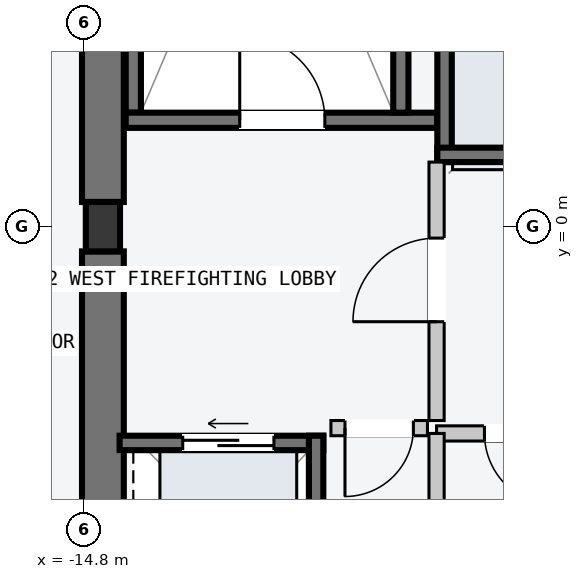
"""IFC4 building model, lengths in metres.
Left out: names, types, materials, properties, quantities, classifications, styles, units other than length and angle.
Written with IfcOpenShell. Run it as: python <this file> out.ifc"""

import sys

from ifc_helpers import new_model, si_unit, direction, frame, frame_2d, origin, origin_2d, place, context, subcontext, project, spatial, rectangle, i_section, extrude, element, fill, save


model = new_model("IFC4")
c1 = context("Model", 3, precision=1e-05, world=origin(), true_north=direction((0.0, 1.0)))
c2 = subcontext(c1, "Body", "Model", "MODEL_VIEW")
j1 = project(units=[si_unit("LENGTHUNIT", "METRE"), si_unit("PLANEANGLEUNIT", "RADIAN")], contexts=[c1])
p1 = place(None, origin())
s1 = spatial("IfcSite", under=j1, at=p1, CompositionType="ELEMENT")
p2 = place(p1, origin())
s2 = spatial("IfcBuilding", under=s1, at=p2, CompositionType="ELEMENT")
p3 = place(p2, frame((0.0, 0.0, 49.2)))
s3 = spatial("IfcBuildingStorey", under=s2, at=p3, CompositionType="ELEMENT", Elevation=49.2)
for number, where, z_axis, x_axis in (
    (1, (-14.55, -9.425, -0.2), (0.0, 0.0, 1.0), (0.0, 1.0, 0.0)),
    (2, (-14.55, 0.325, -0.2), (0.0, 0.0, 1.0), (0.0, 1.0, 0.0)),
):
    element("IfcWall", number, at=place(p3, frame(where, z_axis=z_axis, x_axis=x_axis)), inside=s3, PredefinedType="SHEAR", context=c2, shape_type="SweptSolid", body=[
        extrude(rectangle(XDim=9.1, YDim=0.55, at=frame_2d((4.55, 0.0))), origin(), (0.0, 0.0, 1.0), 3.6),
    ])
p4 = place(p3, frame((-14.15, 1.5, -0.2), z_axis=(0.0, 0.0, 1.0), x_axis=(0.0, 1.0, 0.0)))
e3 = element("IfcWall", 3, at=p4, inside=s3, PredefinedType="SOLIDWALL", context=c2, shape_type="SweptSolid", body=[
    extrude(rectangle(XDim=7.8, YDim=0.2, at=frame_2d((3.9, 0.0))), origin(), (0.0, 0.0, 1.0), 3.6),
])
p5 = place(p3, frame((-14.25, 1.4, -0.2), z_axis=(0.0, 0.0, 1.0), x_axis=(1.0, 0.0, 0.0)))
e4 = element("IfcWall", 4, at=p5, inside=s3, PredefinedType="SOLIDWALL", context=c2, shape_type="SweptSolid", body=[
    extrude(rectangle(XDim=4.1, YDim=0.2, at=frame_2d((2.05, 0.0))), origin(), (0.0, 0.0, 1.0), 3.6),
])
p6 = place(p5, frame((1.5, 0.0, 0.2)))
e5 = element("IfcOpeningElement", 5, at=p6, cuts=e4, PredefinedType="OPENING", context=c2, shape_type="SweptSolid", body=[
    extrude(rectangle(XDim=1.12, YDim=2.18, at=frame_2d((0.56, 1.09))), frame((0.0, 0.11, 0.0), z_axis=(0.0, -1.0, 0.0), x_axis=(1.0, 0.0, 0.0)), (0.0, 0.0, 1.0), 0.22),
])
p7 = place(p3, frame((-10.63, 1.5, -0.2), z_axis=(0.0, 0.0, 1.0), x_axis=(0.0, 1.0, 0.0)))
e6 = element("IfcWall", 6, at=p7, inside=s3, PredefinedType="SOLIDWALL", context=c2, shape_type="SweptSolid", body=[
    extrude(rectangle(XDim=7.8, YDim=0.2, at=frame_2d((3.9, 0.0))), origin(), (0.0, 0.0, 1.0), 3.6),
])
p8 = place(p3, frame((-14.55, 0.0, 0.0), z_axis=(0.0, 0.0, 1.0), x_axis=(1.0, 0.0, 0.0)))
e7 = element("IfcColumn", 7, at=p8, inside=s3, PredefinedType="COLUMN", context=c2, shape_type="SweptSolid", body=[
    extrude(i_section(OverallWidth=0.45, OverallDepth=0.65, WebThickness=0.025, FlangeThickness=0.04, at=origin_2d()), origin(), (0.0, 0.0, 1.0), 3.6),
])
p9 = place(p3, frame((-10.055, 0.85, -0.2), z_axis=(0.0, 0.0, 1.0), x_axis=(0.0, 1.0, 0.0)))
e8 = element("IfcWall", 8, at=p9, inside=s3, PredefinedType="SOLIDWALL", context=c2, shape_type="SweptSolid", body=[
    extrude(rectangle(XDim=1.9, YDim=0.19, at=frame_2d((0.95, 0.0))), origin(), (0.0, 0.0, 1.0), 3.6),
])
p10 = place(p3, frame((-10.15, 0.945, -0.2), z_axis=(0.0, 0.0, 1.0), x_axis=(1.0, 0.0, 0.0)))
e9 = element("IfcWall", 9, at=p10, inside=s3, PredefinedType="SOLIDWALL", context=c2, shape_type="SweptSolid", body=[
    extrude(rectangle(XDim=2.2, YDim=0.19, at=frame_2d((1.1, 0.0))), origin(), (0.0, 0.0, 1.0), 3.6),
])
p11 = place(p3, frame((-14.33, -2.845, -0.2), z_axis=(0.0, 0.0, 1.0), x_axis=(1.0, 0.0, 0.0)))
e10 = element("IfcWall", 10, at=p11, inside=s3, PredefinedType="SOLIDWALL", context=c2, shape_type="SweptSolid", body=[
    extrude(rectangle(XDim=2.68, YDim=0.19, at=frame_2d((1.34, 0.0))), origin(), (0.0, 0.0, 1.0), 3.6),
])
p12 = place(p11, frame((0.83, 0.0, 0.2)))
e11 = element("IfcOpeningElement", 11, at=p12, cuts=e10, PredefinedType="OPENING", context=c2, shape_type="SweptSolid", body=[
    extrude(rectangle(XDim=1.2, YDim=2.2, at=frame_2d((0.6, 1.1))), frame((0.0, 0.105, 0.0), z_axis=(0.0, -1.0, 0.0), x_axis=(1.0, 0.0, 0.0)), (0.0, 0.0, 1.0), 0.21),
])
p13 = place(p3, frame((-11.745, -5.35, -0.2), z_axis=(0.0, 0.0, 1.0), x_axis=(0.0, 1.0, 0.0)))
e12 = element("IfcWall", 12, at=p13, inside=s3, PredefinedType="SOLIDWALL", context=c2, shape_type="SweptSolid", body=[
    extrude(rectangle(XDim=2.6, YDim=0.19, at=frame_2d((1.3, 0.0))), origin(), (0.0, 0.0, 1.0), 3.6),
])
p14 = place(p3, frame((-10.16, -2.55, 0.0), z_axis=(0.0, 0.0, 1.0), x_axis=(0.0, 1.0, 0.0)))
e13 = element("IfcWall", 13, at=p14, inside=s3, PredefinedType="PARTITIONING", context=c2, shape_type="SweptSolid", body=[
    extrude(rectangle(XDim=3.4, YDim=0.2, at=frame_2d((1.7, 0.0))), origin(), (0.0, 0.0, 1.0), 3.4),
])
p15 = place(p14, frame((1.3, 0.0, 0.0)))
e14 = element("IfcOpeningElement", 14, at=p15, cuts=e13, PredefinedType="OPENING", context=c2, shape_type="SweptSolid", body=[
    extrude(rectangle(XDim=1.1, YDim=2.15, at=frame_2d((0.55, 1.075))), frame((0.0, 0.11, 0.0), z_axis=(0.0, -1.0, 0.0), x_axis=(1.0, 0.0, 0.0)), (0.0, 0.0, 1.0), 0.22),
])
p16 = place(p3, frame((-10.28, -2.65, 0.0), z_axis=(0.0, 0.0, 1.0), x_axis=(-1.0, 0.0, 0.0)))
e15 = element("IfcWall", 15, at=p16, inside=s3, PredefinedType="PARTITIONING", context=c2, shape_type="SweptSolid", body=[
    extrude(rectangle(XDim=1.27, YDim=0.2, at=frame_2d((0.635, 0.0))), origin(), (0.0, 0.0, 1.0), 3.4),
])
p17 = place(p16, frame((0.185, 0.0, 0.0)))
e16 = element("IfcOpeningElement", 16, at=p17, cuts=e15, PredefinedType="OPENING", context=c2, shape_type="SweptSolid", body=[
    extrude(rectangle(XDim=0.9, YDim=2.15, at=frame_2d((0.45, 1.075))), frame((0.0, 0.11, 0.0), z_axis=(0.0, -1.0, 0.0), x_axis=(1.0, 0.0, 0.0)), (0.0, 0.0, 1.0), 0.22),
])
p18 = place(p3, frame((-7.96, -2.72, 0.0), z_axis=(0.0, 0.0, 1.0), x_axis=(-1.0, 0.0, 0.0)))
e17 = element("IfcWall", 17, at=p18, inside=s3, PredefinedType="PARTITIONING", context=c2, shape_type="SweptSolid", body=[
    extrude(rectangle(XDim=2.2, YDim=0.2, at=frame_2d((1.1, 0.0))), origin(), (0.0, 0.0, 1.0), 3.4),
])
p19 = place(p18, frame((0.62, 0.0, 0.0)))
e18 = element("IfcOpeningElement", 18, at=p19, cuts=e17, PredefinedType="OPENING", context=c2, shape_type="SweptSolid", body=[
    extrude(rectangle(XDim=0.95, YDim=2.1, at=frame_2d((0.475, 1.05))), frame((0.0, 0.11, 0.0), z_axis=(0.0, -1.0, 0.0), x_axis=(1.0, 0.0, 0.0)), (0.0, 0.0, 1.0), 0.22),
])
p20 = place(p3, frame((-10.16, -5.16, 0.0), z_axis=(0.0, 0.0, 1.0), x_axis=(0.0, 1.0, 0.0)))
e19 = element("IfcWall", 19, at=p20, inside=s3, PredefinedType="PARTITIONING", context=c2, shape_type="SweptSolid", body=[
    extrude(rectangle(XDim=2.44, YDim=0.2, at=frame_2d((1.22, 0.0))), origin(), (0.0, 0.0, 1.0), 3.4),
])
p21 = place(p6, origin())
e20 = element("IfcDoor", 20, at=p21, inside=s3, OperationType="SINGLE_SWING_LEFT", PredefinedType="DOOR", context=c2, shape_type="SweptSolid", body=[
    extrude(rectangle(XDim=1.12, YDim=2.18, at=frame_2d((0.56, 1.09))), frame((0.0, 0.025, 0.0), z_axis=(0.0, -1.0, 0.0), x_axis=(1.0, 0.0, 0.0)), (0.0, 0.0, 1.0), 0.05),
])
fill(e5, e20)
p22 = place(p12, origin())
e21 = element("IfcDoor", 21, at=p22, inside=s3, OperationType="SLIDING_TO_LEFT", PredefinedType="DOOR", context=c2, shape_type="SweptSolid", body=[
    extrude(rectangle(XDim=1.2, YDim=2.2, at=frame_2d((0.6, 1.1))), frame((0.0, 0.025, 0.0), z_axis=(0.0, -1.0, 0.0), x_axis=(1.0, 0.0, 0.0)), (0.0, 0.0, 1.0), 0.05),
])
fill(e11, e21)
p23 = place(p15, origin())
e22 = element("IfcDoor", 22, at=p23, inside=s3, OperationType="SINGLE_SWING_LEFT", PredefinedType="DOOR", context=c2, shape_type="SweptSolid", body=[
    extrude(rectangle(XDim=1.1, YDim=2.15, at=frame_2d((0.55, 1.075))), frame((0.0, 0.025, 0.0), z_axis=(0.0, -1.0, 0.0), x_axis=(1.0, 0.0, 0.0)), (0.0, 0.0, 1.0), 0.05),
])
fill(e14, e22)
p24 = place(p17, origin())
e23 = element("IfcDoor", 23, at=p24, inside=s3, OperationType="SINGLE_SWING_RIGHT", PredefinedType="DOOR", context=c2, shape_type="SweptSolid", body=[
    extrude(rectangle(XDim=0.9, YDim=2.15, at=frame_2d((0.45, 1.075))), frame((0.0, 0.025, 0.0), z_axis=(0.0, -1.0, 0.0), x_axis=(1.0, 0.0, 0.0)), (0.0, 0.0, 1.0), 0.05),
])
fill(e16, e23)
p25 = place(p19, origin())
e24 = element("IfcDoor", 24, at=p25, inside=s3, OperationType="SINGLE_SWING_LEFT", PredefinedType="DOOR", context=c2, shape_type="SweptSolid", body=[
    extrude(rectangle(XDim=0.95, YDim=2.1, at=frame_2d((0.475, 1.05))), frame((0.0, 0.025, 0.0), z_axis=(0.0, -1.0, 0.0), x_axis=(1.0, 0.0, 0.0)), (0.0, 0.0, 1.0), 0.05),
])
fill(e18, e24)
save(model, sys.argv[1])
